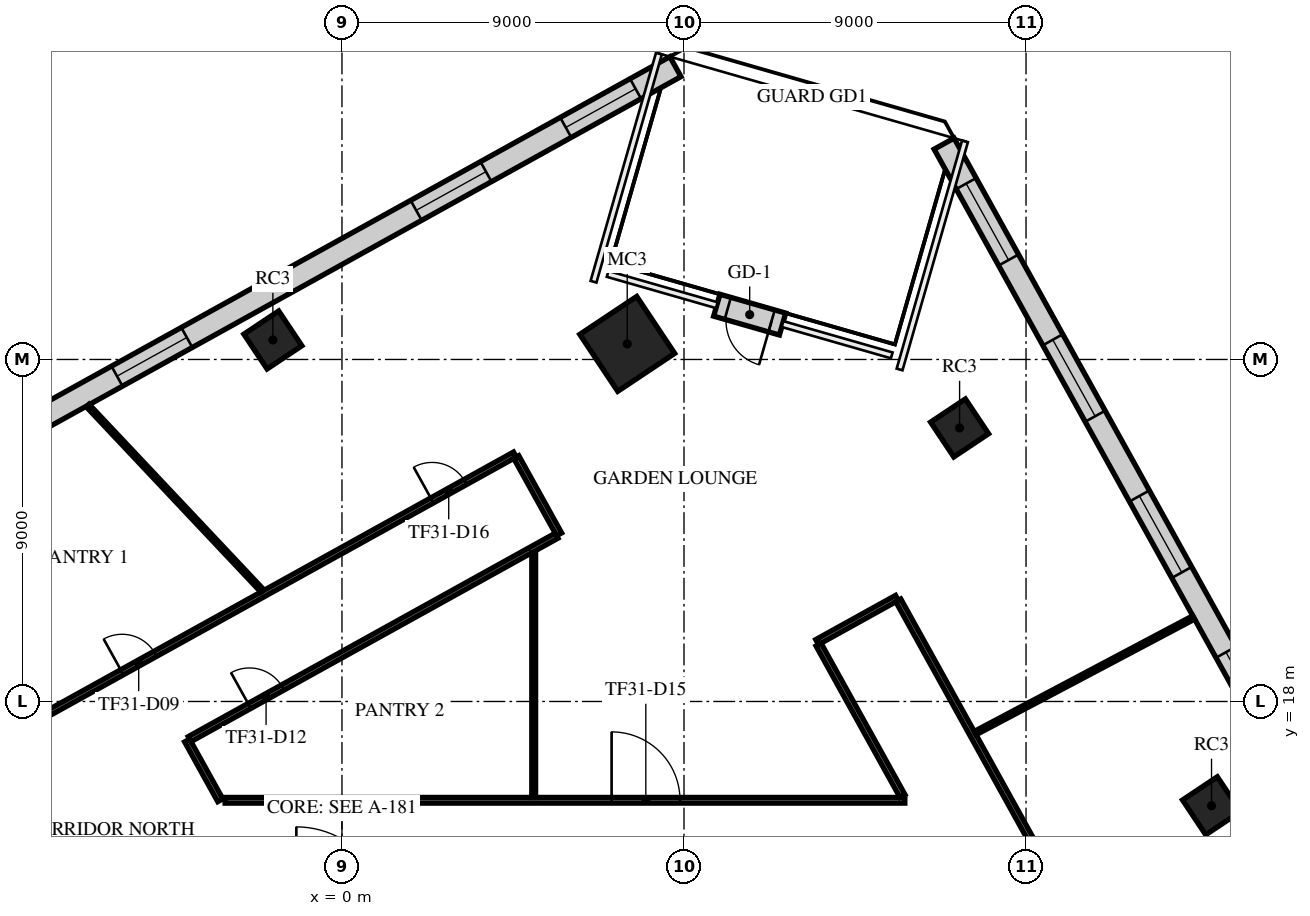
"""IFC4 building model, lengths in metres.
Left out: names, types, materials, properties, quantities, classifications, styles, units other than length and angle.
Written with IfcOpenShell. Run it as: python <this file> out.ifc"""

import sys

from ifc_helpers import new_model, si_unit, direction, frame, frame_2d, origin, origin_2d, place, context, subcontext, project, spatial, rectangle, extrude, element, fill, save


model = new_model("IFC4")
c1 = context("Model", 3, precision=1e-05, world=origin(), true_north=direction((0.0, 1.0)))
c2 = subcontext(c1, "Body", "Model", "MODEL_VIEW")
j1 = project(units=[si_unit("LENGTHUNIT", "METRE"), si_unit("PLANEANGLEUNIT", "RADIAN")], contexts=[c1])
p1 = place(None, origin())
s1 = spatial("IfcSite", under=j1, at=p1, CompositionType="ELEMENT")
p2 = place(p1, origin())
s2 = spatial("IfcBuilding", under=s1, at=p2, CompositionType="ELEMENT")
p3 = place(p2, frame((0.0, 0.0, 135.7)))
s3 = spatial("IfcBuildingStorey", under=s2, at=p3, CompositionType="ELEMENT", Elevation=135.7)
p4 = place(p3, frame((7.506, 27.41, -0.4), z_axis=(0.0, 0.0, 1.0), x_axis=(0.832028680356, 0.55473261583, 0.0)))
e1 = element("IfcColumn", 1, at=p4, inside=s3, PredefinedType="COLUMN", context=c2, shape_type="SweptSolid", body=[
    extrude(rectangle(XDim=1.8, YDim=1.8, at=origin_2d()), origin(), (0.0, 0.0, 1.0), 4.4),
])
for number, where, z_axis, x_axis in (
    (2, (-1.818, 27.513, -0.4), (0.0, 0.0, 1.0), (0.832, 0.555, 0.0)),
    (3, (22.881, 15.255, -0.4), (0.0, 0.0, 1.0), (0.832, 0.555, 0.0)),
    (4, (16.252, 25.198, -0.4), (0.0, 0.0, 1.0), (0.832, 0.555, 0.0)),
):
    element("IfcColumn", number, at=place(p3, frame(where, z_axis=z_axis, x_axis=x_axis)), inside=s3, PredefinedType="COLUMN", context=c2, shape_type="SweptSolid", body=[
        extrude(rectangle(XDim=1.1, YDim=1.1, at=origin_2d()), origin(), (0.0, 0.0, 1.0), 4.4),
    ])
p5 = place(p3, frame((8.775, 34.705, 0.0), z_axis=(0.0, 0.0, 1.0), x_axis=(-0.874620778241, -0.484807687922, 0.0)))
e5 = element("IfcWall", 5, at=p5, inside=s3, PredefinedType="STANDARD", context=c2, shape_type="SweptSolid", body=[
    extrude(rectangle(XDim=49.376, YDim=0.6, at=frame_2d((24.688, 0.0))), origin(), (0.0, 0.0, 1.0), 3.6),
])
p6 = place(p5, frame((1.2, 0.0, 0.9)))
e6 = element("IfcOpeningElement", 6, at=p6, cuts=e5, PredefinedType="OPENING", context=c2, shape_type="SweptSolid", body=[
    extrude(rectangle(XDim=2.1, YDim=2.1, at=frame_2d((1.05, 1.05))), frame((0.0, 0.31, 0.0), z_axis=(0.0, -1.0, 0.0), x_axis=(1.0, 0.0, 0.0)), (0.0, 0.0, 1.0), 0.62),
])
p7 = place(p5, frame((5.7, 0.0, 0.9)))
e7 = element("IfcOpeningElement", 7, at=p7, cuts=e5, PredefinedType="OPENING", context=c2, shape_type="SweptSolid", body=[
    extrude(rectangle(XDim=2.1, YDim=2.1, at=frame_2d((1.05, 1.05))), frame((0.0, 0.31, 0.0), z_axis=(0.0, -1.0, 0.0), x_axis=(1.0, 0.0, 0.0)), (0.0, 0.0, 1.0), 0.62),
])
p8 = place(p5, frame((14.7, 0.0, 0.9)))
e8 = element("IfcOpeningElement", 8, at=p8, cuts=e5, PredefinedType="OPENING", context=c2, shape_type="SweptSolid", body=[
    extrude(rectangle(XDim=2.1, YDim=2.1, at=frame_2d((1.05, 1.05))), frame((0.0, 0.31, 0.0), z_axis=(0.0, -1.0, 0.0), x_axis=(1.0, 0.0, 0.0)), (0.0, 0.0, 1.0), 0.62),
])
p9 = place(p5, frame((19.2, 0.0, 0.9)))
e9 = element("IfcOpeningElement", 9, at=p9, cuts=e5, PredefinedType="OPENING", context=c2, shape_type="SweptSolid", body=[
    extrude(rectangle(XDim=2.1, YDim=2.1, at=frame_2d((1.05, 1.05))), frame((0.0, 0.31, 0.0), z_axis=(0.0, -1.0, 0.0), x_axis=(1.0, 0.0, 0.0)), (0.0, 0.0, 1.0), 0.62),
])
p10 = place(p5, frame((23.7, 0.0, 0.9)))
e10 = element("IfcOpeningElement", 10, at=p10, cuts=e5, PredefinedType="OPENING", context=c2, shape_type="SweptSolid", body=[
    extrude(rectangle(XDim=2.1, YDim=2.1, at=frame_2d((1.05, 1.05))), frame((0.0, 0.31, 0.0), z_axis=(0.0, -1.0, 0.0), x_axis=(1.0, 0.0, 0.0)), (0.0, 0.0, 1.0), 0.62),
])
p11 = place(p5, frame((28.2, 0.0, 0.9)))
e11 = element("IfcOpeningElement", 11, at=p11, cuts=e5, PredefinedType="OPENING", context=c2, shape_type="SweptSolid", body=[
    extrude(rectangle(XDim=2.1, YDim=2.1, at=frame_2d((1.05, 1.05))), frame((0.0, 0.31, 0.0), z_axis=(0.0, -1.0, 0.0), x_axis=(1.0, 0.0, 0.0)), (0.0, 0.0, 1.0), 0.62),
])
p12 = place(p5, frame((32.7, 0.0, 0.9)))
e12 = element("IfcOpeningElement", 12, at=p12, cuts=e5, PredefinedType="OPENING", context=c2, shape_type="SweptSolid", body=[
    extrude(rectangle(XDim=2.1, YDim=2.1, at=frame_2d((1.05, 1.05))), frame((0.0, 0.31, 0.0), z_axis=(0.0, -1.0, 0.0), x_axis=(1.0, 0.0, 0.0)), (0.0, 0.0, 1.0), 0.62),
])
p13 = place(p5, frame((37.2, 0.0, 0.9)))
e13 = element("IfcOpeningElement", 13, at=p13, cuts=e5, PredefinedType="OPENING", context=c2, shape_type="SweptSolid", body=[
    extrude(rectangle(XDim=2.1, YDim=2.1, at=frame_2d((1.05, 1.05))), frame((0.0, 0.31, 0.0), z_axis=(0.0, -1.0, 0.0), x_axis=(1.0, 0.0, 0.0)), (0.0, 0.0, 1.0), 0.62),
])
p14 = place(p5, frame((41.7, 0.0, 0.9)))
e14 = element("IfcOpeningElement", 14, at=p14, cuts=e5, PredefinedType="OPENING", context=c2, shape_type="SweptSolid", body=[
    extrude(rectangle(XDim=2.1, YDim=2.1, at=frame_2d((1.05, 1.05))), frame((0.0, 0.31, 0.0), z_axis=(0.0, -1.0, 0.0), x_axis=(1.0, 0.0, 0.0)), (0.0, 0.0, 1.0), 0.62),
])
p15 = place(p5, frame((46.138, 0.0, 0.9)))
e15 = element("IfcOpeningElement", 15, at=p15, cuts=e5, PredefinedType="OPENING", context=c2, shape_type="SweptSolid", body=[
    extrude(rectangle(XDim=2.1, YDim=2.1, at=frame_2d((1.05, 1.05))), frame((0.0, 0.31, 0.0), z_axis=(0.0, -1.0, 0.0), x_axis=(1.0, 0.0, 0.0)), (0.0, 0.0, 1.0), 0.62),
])
p16 = place(p3, frame((36.291, -4.209, 0.0), z_axis=(0.0, 0.0, 1.0), x_axis=(-0.484811111615, 0.874618880458, 0.0)))
e16 = element("IfcWall", 16, at=p16, inside=s3, PredefinedType="STANDARD", context=c2, shape_type="SweptSolid", body=[
    extrude(rectangle(XDim=42.176, YDim=0.6, at=frame_2d((21.088, 0.0))), origin(), (0.0, 0.0, 1.0), 3.6),
])
p17 = place(p16, frame((1.138, 0.0, 0.9)))
e17 = element("IfcOpeningElement", 17, at=p17, cuts=e16, PredefinedType="OPENING", context=c2, shape_type="SweptSolid", body=[
    extrude(rectangle(XDim=2.3, YDim=2.1, at=frame_2d((1.15, 1.05))), frame((0.0, 0.31, 0.0), z_axis=(0.0, -1.0, 0.0), x_axis=(1.0, 0.0, 0.0)), (0.0, 0.0, 1.0), 0.62),
])
p18 = place(p16, frame((5.776, 0.0, 0.9)))
e18 = element("IfcOpeningElement", 18, at=p18, cuts=e16, PredefinedType="OPENING", context=c2, shape_type="SweptSolid", body=[
    extrude(rectangle(XDim=2.3, YDim=2.1, at=frame_2d((1.15, 1.05))), frame((0.0, 0.31, 0.0), z_axis=(0.0, -1.0, 0.0), x_axis=(1.0, 0.0, 0.0)), (0.0, 0.0, 1.0), 0.62),
])
p19 = place(p16, frame((15.176, 0.0, 0.9)))
e19 = element("IfcOpeningElement", 19, at=p19, cuts=e16, PredefinedType="OPENING", context=c2, shape_type="SweptSolid", body=[
    extrude(rectangle(XDim=2.3, YDim=2.1, at=frame_2d((1.15, 1.05))), frame((0.0, 0.31, 0.0), z_axis=(0.0, -1.0, 0.0), x_axis=(1.0, 0.0, 0.0)), (0.0, 0.0, 1.0), 0.62),
])
p20 = place(p16, frame((19.876, 0.0, 0.9)))
e20 = element("IfcOpeningElement", 20, at=p20, cuts=e16, PredefinedType="OPENING", context=c2, shape_type="SweptSolid", body=[
    extrude(rectangle(XDim=2.3, YDim=2.1, at=frame_2d((1.15, 1.05))), frame((0.0, 0.31, 0.0), z_axis=(0.0, -1.0, 0.0), x_axis=(1.0, 0.0, 0.0)), (0.0, 0.0, 1.0), 0.62),
])
p21 = place(p16, frame((24.576, 0.0, 0.9)))
e21 = element("IfcOpeningElement", 21, at=p21, cuts=e16, PredefinedType="OPENING", context=c2, shape_type="SweptSolid", body=[
    extrude(rectangle(XDim=2.3, YDim=2.1, at=frame_2d((1.15, 1.05))), frame((0.0, 0.31, 0.0), z_axis=(0.0, -1.0, 0.0), x_axis=(1.0, 0.0, 0.0)), (0.0, 0.0, 1.0), 0.62),
])
p22 = place(p16, frame((29.276, 0.0, 0.9)))
e22 = element("IfcOpeningElement", 22, at=p22, cuts=e16, PredefinedType="OPENING", context=c2, shape_type="SweptSolid", body=[
    extrude(rectangle(XDim=2.3, YDim=2.1, at=frame_2d((1.15, 1.05))), frame((0.0, 0.31, 0.0), z_axis=(0.0, -1.0, 0.0), x_axis=(1.0, 0.0, 0.0)), (0.0, 0.0, 1.0), 0.62),
])
p23 = place(p16, frame((33.976, 0.0, 0.9)))
e23 = element("IfcOpeningElement", 23, at=p23, cuts=e16, PredefinedType="OPENING", context=c2, shape_type="SweptSolid", body=[
    extrude(rectangle(XDim=2.3, YDim=2.1, at=frame_2d((1.15, 1.05))), frame((0.0, 0.31, 0.0), z_axis=(0.0, -1.0, 0.0), x_axis=(1.0, 0.0, 0.0)), (0.0, 0.0, 1.0), 0.62),
])
p24 = place(p16, frame((38.676, 0.0, 0.9)))
e24 = element("IfcOpeningElement", 24, at=p24, cuts=e16, PredefinedType="OPENING", context=c2, shape_type="SweptSolid", body=[
    extrude(rectangle(XDim=2.3, YDim=2.1, at=frame_2d((1.15, 1.05))), frame((0.0, 0.31, 0.0), z_axis=(0.0, -1.0, 0.0), x_axis=(1.0, 0.0, 0.0)), (0.0, 0.0, 1.0), 0.62),
])
p25 = place(p3, frame((11.594, 27.932, 0.0), z_axis=(0.0, 0.0, 1.0), x_axis=(-0.96127791106, 0.275580800688, 0.0)))
e25 = element("IfcWall", 25, at=p25, inside=s3, PredefinedType="STANDARD", context=c2, shape_type="SweptSolid", body=[
    extrude(rectangle(XDim=1.8, YDim=0.6, at=frame_2d((0.9, 0.0))), origin(), (0.0, 0.0, 1.0), 3.6),
])
p26 = place(p25, frame((0.3, 0.0, 0.0)))
e26 = element("IfcOpeningElement", 26, at=p26, cuts=e25, PredefinedType="OPENING", context=c2, shape_type="SweptSolid", body=[
    extrude(rectangle(XDim=1.2, YDim=2.4, at=frame_2d((0.6, 1.2))), frame((0.0, 0.31, 0.0), z_axis=(0.0, -1.0, 0.0), x_axis=(1.0, 0.0, 0.0)), (0.0, 0.0, 1.0), 0.62),
])
p27 = place(p3, frame((-23.187, 9.123, 0.0), z_axis=(0.0, 0.0, 1.0), x_axis=(0.874618419846, 0.484811942578, 0.0)))
e27 = element("IfcWall", 27, at=p27, inside=s3, PredefinedType="PARTITIONING", context=c2, shape_type="SweptSolid", body=[
    extrude(rectangle(XDim=31.713, YDim=0.15, at=frame_2d((15.857, 0.0))), origin(), (0.0, 0.0, 1.0), 3.15),
])
p28 = place(p27, frame((11.252, 0.0, 0.0)))
e28 = element("IfcOpeningElement", 28, at=p28, cuts=e27, PredefinedType="OPENING", context=c2, shape_type="SweptSolid", body=[
    extrude(rectangle(XDim=1.0, YDim=2.1, at=frame_2d((0.5, 1.05))), frame((0.0, 0.085, 0.0), z_axis=(0.0, -1.0, 0.0), x_axis=(1.0, 0.0, 0.0)), (0.0, 0.0, 1.0), 0.17),
])
p29 = place(p27, frame((19.896, 0.0, 0.0)))
e29 = element("IfcOpeningElement", 29, at=p29, cuts=e27, PredefinedType="OPENING", context=c2, shape_type="SweptSolid", body=[
    extrude(rectangle(XDim=1.0, YDim=2.1, at=frame_2d((0.5, 1.05))), frame((0.0, 0.085, 0.0), z_axis=(0.0, -1.0, 0.0), x_axis=(1.0, 0.0, 0.0)), (0.0, 0.0, 1.0), 0.17),
])
p30 = place(p27, frame((29.223, 0.0, 0.0)))
e30 = element("IfcOpeningElement", 30, at=p30, cuts=e27, PredefinedType="OPENING", context=c2, shape_type="SweptSolid", body=[
    extrude(rectangle(XDim=1.0, YDim=2.1, at=frame_2d((0.5, 1.05))), frame((0.0, 0.085, 0.0), z_axis=(0.0, -1.0, 0.0), x_axis=(1.0, 0.0, 0.0)), (0.0, 0.0, 1.0), 0.17),
])
p31 = place(p3, frame((-4.074, 16.973, 0.0), z_axis=(0.0, 0.0, 1.0), x_axis=(0.484870548803, -0.874585931114, 0.0)))
e31 = element("IfcWall", 31, at=p31, inside=s3, PredefinedType="PARTITIONING", context=c2, shape_type="SweptSolid", body=[
    extrude(rectangle(XDim=1.799, YDim=0.15, at=frame_2d((0.899, 0.0))), origin(), (0.0, 0.0, 1.0), 3.6),
])
p32 = place(p3, frame((-4.008, 17.01, 0.0), z_axis=(0.0, 0.0, 1.0), x_axis=(0.874611645774, 0.484824163049, 0.0)))
e32 = element("IfcWall", 32, at=p32, inside=s3, PredefinedType="PARTITIONING", context=c2, shape_type="SweptSolid", body=[
    extrude(rectangle(XDim=11.041, YDim=0.15, at=frame_2d((5.521, 0.0))), origin(), (0.0, 0.0, 1.0), 3.15),
])
p33 = place(p32, frame((1.8, 0.0, 0.0)))
e33 = element("IfcOpeningElement", 33, at=p33, cuts=e32, PredefinedType="OPENING", context=c2, shape_type="SweptSolid", body=[
    extrude(rectangle(XDim=1.0, YDim=2.1, at=frame_2d((0.5, 1.05))), frame((0.0, 0.085, 0.0), z_axis=(0.0, -1.0, 0.0), x_axis=(1.0, 0.0, 0.0)), (0.0, 0.0, 1.0), 0.17),
])
p34 = place(p3, frame((-3.075, 15.4, 0.0), z_axis=(0.0, 0.0, 1.0), x_axis=(1.0, 0.0, 0.0)))
e34 = element("IfcWall", 34, at=p34, inside=s3, PredefinedType="PARTITIONING", context=c2, shape_type="SweptSolid", body=[
    extrude(rectangle(XDim=17.886, YDim=0.15, at=frame_2d((8.943, 0.0))), origin(), (0.0, 0.0, 1.0), 3.15),
])
p35 = place(p34, frame((10.17, 0.0, 0.0)))
e35 = element("IfcOpeningElement", 35, at=p35, cuts=e34, PredefinedType="OPENING", context=c2, shape_type="SweptSolid", body=[
    extrude(rectangle(XDim=1.8, YDim=2.1, at=frame_2d((0.9, 1.05))), frame((0.0, 0.085, 0.0), z_axis=(0.0, -1.0, 0.0), x_axis=(1.0, 0.0, 0.0)), (0.0, 0.0, 1.0), 0.17),
])
p36 = place(p3, frame((4.586, 24.432, 0.0), z_axis=(0.0, 0.0, 1.0), x_axis=(0.484983092102, -0.874523527628, 0.0)))
e36 = element("IfcWall", 36, at=p36, inside=s3, PredefinedType="PARTITIONING", context=c2, shape_type="SweptSolid", body=[
    extrude(rectangle(XDim=2.325, YDim=0.15, at=frame_2d((1.163, 0.0))), origin(), (0.0, 0.0, 1.0), 3.6),
])
p37 = place(p3, frame((12.504, 19.563, 0.0), z_axis=(0.0, 0.0, 1.0), x_axis=(0.874703778473, 0.484657920522, 0.0)))
e37 = element("IfcWall", 37, at=p37, inside=s3, PredefinedType="PARTITIONING", context=c2, shape_type="SweptSolid", body=[
    extrude(rectangle(XDim=2.4, YDim=0.15, at=frame_2d((1.2, 0.0))), origin(), (0.0, 0.0, 1.0), 3.15),
])
p38 = place(p3, frame((12.54, 19.497, 0.0), z_axis=(0.0, 0.0, 1.0), x_axis=(0.48474201542, -0.874657177691, 0.0)))
e38 = element("IfcWall", 38, at=p38, inside=s3, PredefinedType="PARTITIONING", context=c2, shape_type="SweptSolid", body=[
    extrude(rectangle(XDim=4.557, YDim=0.15, at=frame_2d((2.279, 0.0))), origin(), (0.0, 0.0, 1.0), 3.15),
])
p39 = place(p3, frame((14.639, 20.66, 0.0), z_axis=(0.0, 0.0, 1.0), x_axis=(0.484803020703, -0.874623365294, 0.0)))
e39 = element("IfcWall", 39, at=p39, inside=s3, PredefinedType="PARTITIONING", context=c2, shape_type="SweptSolid", body=[
    extrude(rectangle(XDim=22.02, YDim=0.15, at=frame_2d((11.01, 0.0))), origin(), (0.0, 0.0, 1.0), 3.15),
])
p40 = place(p39, frame((10.083, 0.0, 0.0)))
e40 = element("IfcOpeningElement", 40, at=p40, cuts=e39, PredefinedType="OPENING", context=c2, shape_type="SweptSolid", body=[
    extrude(rectangle(XDim=1.0, YDim=2.1, at=frame_2d((0.5, 1.05))), frame((0.0, 0.085, 0.0), z_axis=(0.0, -1.0, 0.0), x_axis=(1.0, 0.0, 0.0)), (0.0, 0.0, 1.0), 0.17),
])
p41 = place(p3, frame((-6.691, 25.788, 0.0), z_axis=(0.0, 0.0, 1.0), x_axis=(0.685723912774, -0.727861741988, 0.0)))
e41 = element("IfcWall", 41, at=p41, inside=s3, PredefinedType="PARTITIONING", context=c2, shape_type="SweptSolid", body=[
    extrude(rectangle(XDim=6.698, YDim=0.1, at=frame_2d((3.349, 0.0))), origin(), (0.0, 0.0, 1.0), 3.15),
])
p42 = place(p3, frame((5.045, 15.475, 0.0), z_axis=(0.0, 0.0, 1.0), x_axis=(0.0, 1.0, 0.0)))
e42 = element("IfcWall", 42, at=p42, inside=s3, PredefinedType="PARTITIONING", context=c2, shape_type="SweptSolid", body=[
    extrude(rectangle(XDim=6.439, YDim=0.1, at=frame_2d((3.22, 0.0))), origin(), (0.0, 0.0, 1.0), 3.6),
])
p43 = place(p3, frame((16.662, 17.168, 0.0), z_axis=(0.0, 0.0, 1.0), x_axis=(0.883911173827, 0.467654826538, 0.0)))
e43 = element("IfcWall", 43, at=p43, inside=s3, PredefinedType="PARTITIONING", context=c2, shape_type="SweptSolid", body=[
    extrude(rectangle(XDim=6.503, YDim=0.1, at=frame_2d((3.251, 0.0))), origin(), (0.0, 0.0, 1.0), 3.15),
])
p44 = place(p6, origin())
e44 = element("IfcWindow", 44, at=p44, inside=s3, PartitioningType="SINGLE_PANEL", PredefinedType="WINDOW", context=c2, shape_type="SweptSolid", body=[
    extrude(rectangle(XDim=2.1, YDim=2.1, at=frame_2d((1.05, 1.05))), frame((0.0, 0.03, 0.0), z_axis=(0.0, -1.0, 0.0), x_axis=(1.0, 0.0, 0.0)), (0.0, 0.0, 1.0), 0.06),
])
fill(e6, e44)
p45 = place(p7, origin())
e45 = element("IfcWindow", 45, at=p45, inside=s3, PartitioningType="SINGLE_PANEL", PredefinedType="WINDOW", context=c2, shape_type="SweptSolid", body=[
    extrude(rectangle(XDim=2.1, YDim=2.1, at=frame_2d((1.05, 1.05))), frame((0.0, 0.03, 0.0), z_axis=(0.0, -1.0, 0.0), x_axis=(1.0, 0.0, 0.0)), (0.0, 0.0, 1.0), 0.06),
])
fill(e7, e45)
p46 = place(p8, origin())
e46 = element("IfcWindow", 46, at=p46, inside=s3, PartitioningType="SINGLE_PANEL", PredefinedType="WINDOW", context=c2, shape_type="SweptSolid", body=[
    extrude(rectangle(XDim=2.1, YDim=2.1, at=frame_2d((1.05, 1.05))), frame((0.0, 0.03, 0.0), z_axis=(0.0, -1.0, 0.0), x_axis=(1.0, 0.0, 0.0)), (0.0, 0.0, 1.0), 0.06),
])
fill(e8, e46)
p47 = place(p21, origin())
e47 = element("IfcWindow", 47, at=p47, inside=s3, PartitioningType="SINGLE_PANEL", PredefinedType="WINDOW", context=c2, shape_type="SweptSolid", body=[
    extrude(rectangle(XDim=2.3, YDim=2.1, at=frame_2d((1.15, 1.05))), frame((0.0, 0.03, 0.0), z_axis=(0.0, -1.0, 0.0), x_axis=(1.0, 0.0, 0.0)), (0.0, 0.0, 1.0), 0.06),
])
fill(e21, e47)
p48 = place(p22, origin())
e48 = element("IfcWindow", 48, at=p48, inside=s3, PartitioningType="SINGLE_PANEL", PredefinedType="WINDOW", context=c2, shape_type="SweptSolid", body=[
    extrude(rectangle(XDim=2.3, YDim=2.1, at=frame_2d((1.15, 1.05))), frame((0.0, 0.03, 0.0), z_axis=(0.0, -1.0, 0.0), x_axis=(1.0, 0.0, 0.0)), (0.0, 0.0, 1.0), 0.06),
])
fill(e22, e48)
p49 = place(p23, origin())
e49 = element("IfcWindow", 49, at=p49, inside=s3, PartitioningType="SINGLE_PANEL", PredefinedType="WINDOW", context=c2, shape_type="SweptSolid", body=[
    extrude(rectangle(XDim=2.3, YDim=2.1, at=frame_2d((1.15, 1.05))), frame((0.0, 0.03, 0.0), z_axis=(0.0, -1.0, 0.0), x_axis=(1.0, 0.0, 0.0)), (0.0, 0.0, 1.0), 0.06),
])
fill(e23, e49)
p50 = place(p24, origin())
e50 = element("IfcWindow", 50, at=p50, inside=s3, PartitioningType="SINGLE_PANEL", PredefinedType="WINDOW", context=c2, shape_type="SweptSolid", body=[
    extrude(rectangle(XDim=2.3, YDim=2.1, at=frame_2d((1.15, 1.05))), frame((0.0, 0.03, 0.0), z_axis=(0.0, -1.0, 0.0), x_axis=(1.0, 0.0, 0.0)), (0.0, 0.0, 1.0), 0.06),
])
fill(e24, e50)
p51 = place(p26, origin())
e51 = element("IfcDoor", 51, at=p51, inside=s3, OperationType="SINGLE_SWING_LEFT", PredefinedType="DOOR", context=c2, shape_type="SweptSolid", body=[
    extrude(rectangle(XDim=1.2, YDim=2.4, at=frame_2d((0.6, 1.2))), frame((0.0, 0.025, 0.0), z_axis=(0.0, -1.0, 0.0), x_axis=(1.0, 0.0, 0.0)), (0.0, 0.0, 1.0), 0.05),
])
fill(e26, e51)
p52 = place(p29, origin())
e52 = element("IfcDoor", 52, at=p52, inside=s3, OperationType="SINGLE_SWING_LEFT", PredefinedType="DOOR", context=c2, shape_type="SweptSolid", body=[
    extrude(rectangle(XDim=1.0, YDim=2.1, at=frame_2d((0.5, 1.05))), frame((0.0, 0.025, 0.0), z_axis=(0.0, -1.0, 0.0), x_axis=(1.0, 0.0, 0.0)), (0.0, 0.0, 1.0), 0.05),
])
fill(e29, e52)
p53 = place(p33, frame((1.0, 0.0, 0.0), z_axis=(0.0, 0.0, 1.0), x_axis=(-1.0, 0.0, 0.0)))
e53 = element("IfcDoor", 53, at=p53, inside=s3, OperationType="SINGLE_SWING_RIGHT", PredefinedType="DOOR", context=c2, shape_type="SweptSolid", body=[
    extrude(rectangle(XDim=1.0, YDim=2.1, at=frame_2d((0.5, 1.05))), frame((0.0, 0.025, 0.0), z_axis=(0.0, -1.0, 0.0), x_axis=(1.0, 0.0, 0.0)), (0.0, 0.0, 1.0), 0.05),
])
fill(e33, e53)
p54 = place(p35, origin())
e54 = element("IfcDoor", 54, at=p54, inside=s3, OperationType="DOUBLE_DOOR_SINGLE_SWING", PredefinedType="DOOR", context=c2, shape_type="SweptSolid", body=[
    extrude(rectangle(XDim=1.8, YDim=2.1, at=frame_2d((0.9, 1.05))), frame((0.0, 0.025, 0.0), z_axis=(0.0, -1.0, 0.0), x_axis=(1.0, 0.0, 0.0)), (0.0, 0.0, 1.0), 0.05),
])
fill(e35, e54)
p55 = place(p30, origin())
e55 = element("IfcDoor", 55, at=p55, inside=s3, OperationType="SINGLE_SWING_LEFT", PredefinedType="DOOR", context=c2, shape_type="SweptSolid", body=[
    extrude(rectangle(XDim=1.0, YDim=2.1, at=frame_2d((0.5, 1.05))), frame((0.0, 0.025, 0.0), z_axis=(0.0, -1.0, 0.0), x_axis=(1.0, 0.0, 0.0)), (0.0, 0.0, 1.0), 0.05),
])
fill(e30, e55)
save(model, sys.argv[1])
